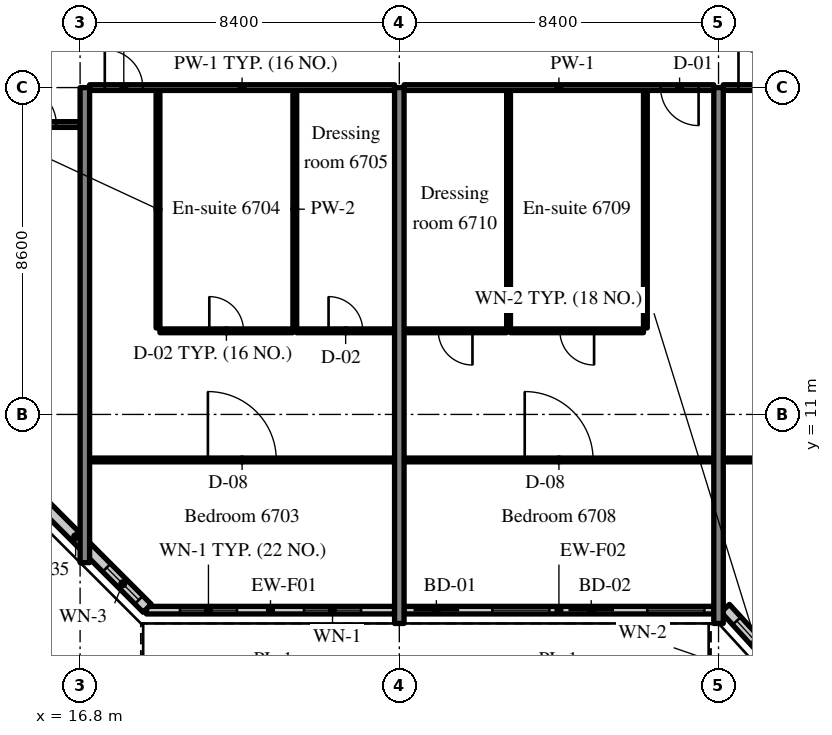
"""IFC4 building model, lengths in metres.
Left out: names, types, materials, properties, quantities, classifications, styles, units other than length and angle.
Written with IfcOpenShell. Run it as: python <this file> out.ifc"""

import sys

from ifc_helpers import new_model, si_unit, direction, frame, frame_2d, origin, place, context, subcontext, project, spatial, rectangle, extrude, source, transform, mapped, element, fill, save


model = new_model("IFC4")
c1 = context("Model", 3, precision=1e-05, world=origin(), true_north=direction((0.0, 1.0)))
c2 = subcontext(c1, "Body", "Model", "MODEL_VIEW")
j1 = project(units=[si_unit("LENGTHUNIT", "METRE"), si_unit("PLANEANGLEUNIT", "RADIAN")], contexts=[c1])
p1 = place(None, origin())
s1 = spatial("IfcSite", under=j1, at=p1, CompositionType="ELEMENT")
p2 = place(p1, origin())
s2 = spatial("IfcBuilding", under=s1, at=p2, CompositionType="ELEMENT")
p3 = place(p2, frame((0.0, 0.0, 281.7)))
s3 = spatial("IfcBuildingStorey", under=s2, at=p3, CompositionType="ELEMENT", Elevation=281.7)
m1 = source(origin(), c2, "Body", "SweptSolid", [
    extrude(rectangle(XDim=12.5, YDim=0.25, at=frame_2d((6.25, 0.0))), origin(), (0.0, 0.0, 1.0), 3.72),
])
p4 = place(p3, frame((16.925, 7.1, 0.0), z_axis=(0.0, 0.0, 1.0), x_axis=(0.0, 1.0, 0.0)))
e1 = element("IfcWall", 1, at=p4, inside=s3, PredefinedType="SHEAR", context=c2, shape_type="MappedRepresentation", body=[
    mapped(m1, transform((0.0, 0.0, 0.0), scale=1.0)),
])
m2 = source(origin(), c2, "Body", "SweptSolid", [
    extrude(rectangle(XDim=14.1, YDim=0.25, at=frame_2d((7.05, 0.0))), origin(), (0.0, 0.0, 1.0), 3.72),
])
for number, where, z_axis, x_axis in (
    (2, (25.2, 5.5, 0.0), (0.0, 0.0, 1.0), (0.0, 1.0, 0.0)),
    (3, (33.6, 5.5, 0.0), (0.0, 0.0, 1.0), (0.0, 1.0, 0.0)),
):
    element("IfcWall", number, at=place(p3, frame(where, z_axis=z_axis, x_axis=x_axis)), inside=s3, PredefinedType="SHEAR", context=c2, shape_type="MappedRepresentation", body=[
        mapped(m2, transform((0.0, 0.0, 0.0), scale=1.0)),
    ])
m3 = source(origin(), c2, "Body", "SweptSolid", [
    extrude(rectangle(XDim=6.53, YDim=0.2, at=frame_2d((3.265, 0.0))), origin(), (0.0, 0.0, 1.0), 3.17),
])
p5 = place(p3, frame((18.545, 5.85, 0.0), z_axis=(0.0, 0.0, 1.0), x_axis=(1.0, 0.0, 0.0)))
e4 = element("IfcWall", 4, at=p5, inside=s3, PredefinedType="SOLIDWALL", context=c2, shape_type="MappedRepresentation", body=[
    mapped(m3, transform((0.0, 0.0, 0.0), scale=1.0)),
])
m4 = source(origin(), c2, "Body", "SweptSolid", [
    extrude(rectangle(XDim=1.5, YDim=1.5, at=frame_2d((0.75, 0.75))), frame((0.0, 0.11, 0.0), z_axis=(0.0, -1.0, 0.0), x_axis=(1.0, 0.0, 0.0)), (0.0, 0.0, 1.0), 0.22),
])
p6 = place(p5, frame((0.883, 0.0, 0.9)))
e5 = element("IfcOpeningElement", 5, at=p6, cuts=e4, PredefinedType="OPENING", context=c2, shape_type="MappedRepresentation", body=[
    mapped(m4, transform((0.0, 0.0, 0.0), scale=1.0)),
])
p7 = place(p5, frame((4.147, 0.0, 0.9)))
e6 = element("IfcOpeningElement", 6, at=p7, cuts=e4, PredefinedType="OPENING", context=c2, shape_type="MappedRepresentation", body=[
    mapped(m4, transform((0.0, 0.0, 0.0), scale=1.0)),
])
m5 = source(origin(), c2, "Body", "SweptSolid", [
    extrude(rectangle(XDim=8.15, YDim=0.2, at=frame_2d((4.075, 0.0))), origin(), (0.0, 0.0, 1.0), 3.17),
])
p8 = place(p3, frame((25.325, 5.85, 0.0), z_axis=(0.0, 0.0, 1.0), x_axis=(1.0, 0.0, 0.0)))
e7 = element("IfcWall", 7, at=p8, inside=s3, PredefinedType="SOLIDWALL", context=c2, shape_type="MappedRepresentation", body=[
    mapped(m5, transform((0.0, 0.0, 0.0), scale=1.0)),
])
m6 = source(origin(), c2, "Body", "SweptSolid", [
    extrude(rectangle(XDim=1.2, YDim=2.4, at=frame_2d((0.6, 1.2))), frame((0.0, 0.11, 0.0), z_axis=(0.0, -1.0, 0.0), x_axis=(1.0, 0.0, 0.0)), (0.0, 0.0, 1.0), 0.22),
])
p9 = place(p8, frame((0.25, 0.0, 0.0)))
e8 = element("IfcOpeningElement", 8, at=p9, cuts=e7, PredefinedType="OPENING", context=c2, shape_type="MappedRepresentation", body=[
    mapped(m6, transform((0.0, 0.0, 0.0), scale=1.0)),
])
p10 = place(p8, frame((2.325, 0.0, 0.9)))
e9 = element("IfcOpeningElement", 9, at=p10, cuts=e7, PredefinedType="OPENING", context=c2, shape_type="MappedRepresentation", body=[
    mapped(m4, transform((0.0, 0.0, 0.0), scale=1.0)),
])
p11 = place(p8, frame((4.325, 0.0, 0.0)))
e10 = element("IfcOpeningElement", 10, at=p11, cuts=e7, PredefinedType="OPENING", context=c2, shape_type="MappedRepresentation", body=[
    mapped(m6, transform((0.0, 0.0, 0.0), scale=1.0)),
])
p12 = place(p8, frame((6.4, 0.0, 0.9)))
e11 = element("IfcOpeningElement", 11, at=p12, cuts=e7, PredefinedType="OPENING", context=c2, shape_type="MappedRepresentation", body=[
    mapped(m4, transform((0.0, 0.0, 0.0), scale=1.0)),
])
m7 = source(origin(), c2, "Body", "SweptSolid", [
    extrude(rectangle(XDim=2.398, YDim=0.3, at=frame_2d((1.199, 0.0))), origin(), (0.0, 0.0, 1.0), 3.72),
])
p13 = place(p3, frame((33.776, 5.9, 0.0), z_axis=(0.0, 0.0, 1.0), x_axis=(0.675374189419, -0.737475222815, 0.0)))
e12 = element("IfcWall", 12, at=p13, inside=s3, PredefinedType="SOLIDWALL", context=c2, shape_type="MappedRepresentation", body=[
    mapped(m7, transform((0.0, 0.0, 0.0), scale=1.0)),
])
m8 = source(origin(), c2, "Body", "SweptSolid", [
    extrude(rectangle(XDim=1.5, YDim=2.0, at=frame_2d((0.75, 1.0))), frame((0.0, 0.16, 0.0), z_axis=(0.0, -1.0, 0.0), x_axis=(1.0, 0.0, 0.0)), (0.0, 0.0, 1.0), 0.32),
])
p14 = place(p13, frame((0.449, 0.0, 0.9)))
e13 = element("IfcOpeningElement", 13, at=p14, cuts=e12, PredefinedType="OPENING", context=c2, shape_type="MappedRepresentation", body=[
    mapped(m8, transform((0.0, 0.0, 0.0), scale=1.0)),
])
m9 = source(origin(), c2, "Body", "SweptSolid", [
    extrude(rectangle(XDim=5.326, YDim=0.3, at=frame_2d((2.663, 0.0))), origin(), (0.0, 0.0, 1.0), 3.72),
])
p15 = place(p3, frame((14.8, 9.666, 0.0), z_axis=(0.0, 0.0, 1.0), x_axis=(0.707083859269, -0.707129702361, 0.0)))
e14 = element("IfcWall", 14, at=p15, inside=s3, PredefinedType="SOLIDWALL", context=c2, shape_type="MappedRepresentation", body=[
    mapped(m9, transform((0.0, 0.0, 0.0), scale=1.0)),
])
m10 = source(origin(), c2, "Body", "SweptSolid", [
    extrude(rectangle(XDim=1.2, YDim=1.5, at=frame_2d((0.6, 0.75))), frame((0.0, 0.16, 0.0), z_axis=(0.0, -1.0, 0.0), x_axis=(1.0, 0.0, 0.0)), (0.0, 0.0, 1.0), 0.32),
])
p16 = place(p15, frame((3.815, 0.0, 0.9)))
e15 = element("IfcOpeningElement", 15, at=p16, cuts=e14, PredefinedType="OPENING", context=c2, shape_type="MappedRepresentation", body=[
    mapped(m10, transform((0.0, 0.0, 0.0), scale=1.0)),
])
m11 = source(origin(), c2, "Body", "SweptSolid", [
    extrude(rectangle(XDim=6.25, YDim=0.1, at=frame_2d((3.125, 0.0))), origin(), (0.0, 0.0, 1.0), 3.72),
])
for number, where, z_axis, x_axis in (
    (16, (18.85, 13.275, 0.0), (0.0, 0.0, 1.0), (0.0, 1.0, 0.0)),
    (17, (22.45, 13.275, 0.0), (0.0, 0.0, 1.0), (0.0, 1.0, 0.0)),
):
    element("IfcWall", number, at=place(p3, frame(where, z_axis=z_axis, x_axis=x_axis)), inside=s3, PredefinedType="PARTITIONING", context=c2, shape_type="MappedRepresentation", body=[
        mapped(m11, transform((0.0, 0.0, 0.0), scale=1.0)),
    ])
m12 = source(origin(), c2, "Body", "SweptSolid", [
    extrude(rectangle(XDim=3.5, YDim=0.1, at=frame_2d((1.75, 0.0))), origin(), (0.0, 0.0, 1.0), 3.72),
])
p17 = place(p3, frame((18.9, 13.2, 0.0), z_axis=(0.0, 0.0, 1.0), x_axis=(1.0, 0.0, 0.0)))
e18 = element("IfcWall", 18, at=p17, inside=s3, PredefinedType="PARTITIONING", context=c2, shape_type="MappedRepresentation", body=[
    mapped(m12, transform((0.0, 0.0, 0.0), scale=1.0)),
])
m13 = source(origin(), c2, "Body", "SweptSolid", [
    extrude(rectangle(XDim=0.9, YDim=2.1, at=frame_2d((0.45, 1.05))), frame((0.0, 0.06, 0.0), z_axis=(0.0, -1.0, 0.0), x_axis=(1.0, 0.0, 0.0)), (0.0, 0.0, 1.0), 0.12),
])
p18 = place(p17, frame((1.3, 0.0, 0.0)))
e19 = element("IfcOpeningElement", 19, at=p18, cuts=e18, PredefinedType="OPENING", context=c2, shape_type="MappedRepresentation", body=[
    mapped(m13, transform((0.0, 0.0, 0.0), scale=1.0)),
])
m14 = source(origin(), c2, "Body", "SweptSolid", [
    extrude(rectangle(XDim=2.575, YDim=0.1, at=frame_2d((1.288, 0.0))), origin(), (0.0, 0.0, 1.0), 3.72),
])
p19 = place(p3, frame((22.5, 13.2, 0.0), z_axis=(0.0, 0.0, 1.0), x_axis=(1.0, 0.0, 0.0)))
e20 = element("IfcWall", 20, at=p19, inside=s3, PredefinedType="PARTITIONING", context=c2, shape_type="MappedRepresentation", body=[
    mapped(m14, transform((0.0, 0.0, 0.0), scale=1.0)),
])
p20 = place(p19, frame((0.838, 0.0, 0.0)))
e21 = element("IfcOpeningElement", 21, at=p20, cuts=e20, PredefinedType="OPENING", context=c2, shape_type="MappedRepresentation", body=[
    mapped(m13, transform((0.0, 0.0, 0.0), scale=1.0)),
])
m15 = source(origin(), c2, "Body", "SweptSolid", [
    extrude(rectangle(XDim=8.025, YDim=0.1, at=frame_2d((4.012, 0.0))), origin(), (0.0, 0.0, 1.0), 3.72),
])
p21 = place(p3, frame((17.05, 9.802, 0.0), z_axis=(0.0, 0.0, 1.0), x_axis=(1.0, 0.0, 0.0)))
e22 = element("IfcWall", 22, at=p21, inside=s3, PredefinedType="PARTITIONING", context=c2, shape_type="MappedRepresentation", body=[
    mapped(m15, transform((0.0, 0.0, 0.0), scale=1.0)),
])
m16 = source(origin(), c2, "Body", "SweptSolid", [
    extrude(rectangle(XDim=1.8, YDim=2.1, at=frame_2d((0.9, 1.05))), frame((0.0, 0.06, 0.0), z_axis=(0.0, -1.0, 0.0), x_axis=(1.0, 0.0, 0.0)), (0.0, 0.0, 1.0), 0.12),
])
p22 = place(p21, frame((3.113, 0.0, 0.0)))
e23 = element("IfcOpeningElement", 23, at=p22, cuts=e22, PredefinedType="OPENING", context=c2, shape_type="MappedRepresentation", body=[
    mapped(m16, transform((0.0, 0.0, 0.0), scale=1.0)),
])
m17 = source(origin(), c2, "Body", "SweptSolid", [
    extrude(rectangle(XDim=8.025, YDim=0.15, at=frame_2d((4.012, 0.0))), origin(), (0.0, 0.0, 1.0), 3.02),
])
p23 = place(p3, frame((17.05, 19.6, 0.0), z_axis=(0.0, 0.0, 1.0), x_axis=(1.0, 0.0, 0.0)))
e24 = element("IfcWall", 24, at=p23, inside=s3, PredefinedType="PARTITIONING", context=c2, shape_type="MappedRepresentation", body=[
    mapped(m17, transform((0.0, 0.0, 0.0), scale=1.0)),
])
m18 = source(origin(), c2, "Body", "SweptSolid", [
    extrude(rectangle(XDim=1.0, YDim=2.1, at=frame_2d((0.5, 1.05))), frame((0.0, 0.085, 0.0), z_axis=(0.0, -1.0, 0.0), x_axis=(1.0, 0.0, 0.0)), (0.0, 0.0, 1.0), 0.17),
])
p24 = place(p23, frame((0.4, 0.0, 0.0)))
e25 = element("IfcOpeningElement", 25, at=p24, cuts=e24, PredefinedType="OPENING", context=c2, shape_type="MappedRepresentation", body=[
    mapped(m18, transform((0.0, 0.0, 0.0), scale=1.0)),
])
for number, where, z_axis, x_axis in (
    (26, (31.675, 13.275, 0.0), (0.0, 0.0, 1.0), (0.0, 1.0, 0.0)),
    (27, (28.075, 13.275, 0.0), (0.0, 0.0, 1.0), (0.0, 1.0, 0.0)),
):
    element("IfcWall", number, at=place(p3, frame(where, z_axis=z_axis, x_axis=x_axis)), inside=s3, PredefinedType="PARTITIONING", context=c2, shape_type="MappedRepresentation", body=[
        mapped(m11, transform((0.0, 0.0, 0.0), scale=1.0)),
    ])
p25 = place(p3, frame((28.125, 13.2, 0.0), z_axis=(0.0, 0.0, 1.0), x_axis=(1.0, 0.0, 0.0)))
e28 = element("IfcWall", 28, at=p25, inside=s3, PredefinedType="PARTITIONING", context=c2, shape_type="MappedRepresentation", body=[
    mapped(m12, transform((0.0, 0.0, 0.0), scale=1.0)),
])
p26 = place(p25, frame((1.3, 0.0, 0.0)))
e29 = element("IfcOpeningElement", 29, at=p26, cuts=e28, PredefinedType="OPENING", context=c2, shape_type="MappedRepresentation", body=[
    mapped(m13, transform((0.0, 0.0, 0.0), scale=1.0)),
])
m19 = source(origin(), c2, "Body", "SweptSolid", [
    extrude(rectangle(XDim=2.7, YDim=0.1, at=frame_2d((1.35, 0.0))), origin(), (0.0, 0.0, 1.0), 3.72),
])
p27 = place(p3, frame((25.325, 13.2, 0.0), z_axis=(0.0, 0.0, 1.0), x_axis=(1.0, 0.0, 0.0)))
e30 = element("IfcWall", 30, at=p27, inside=s3, PredefinedType="PARTITIONING", context=c2, shape_type="MappedRepresentation", body=[
    mapped(m19, transform((0.0, 0.0, 0.0), scale=1.0)),
])
p28 = place(p27, frame((0.9, 0.0, 0.0)))
e31 = element("IfcOpeningElement", 31, at=p28, cuts=e30, PredefinedType="OPENING", context=c2, shape_type="MappedRepresentation", body=[
    mapped(m13, transform((0.0, 0.0, 0.0), scale=1.0)),
])
m20 = source(origin(), c2, "Body", "SweptSolid", [
    extrude(rectangle(XDim=8.15, YDim=0.1, at=frame_2d((4.075, 0.0))), origin(), (0.0, 0.0, 1.0), 3.72),
])
p29 = place(p3, frame((25.325, 9.802, 0.0), z_axis=(0.0, 0.0, 1.0), x_axis=(1.0, 0.0, 0.0)))
e32 = element("IfcWall", 32, at=p29, inside=s3, PredefinedType="PARTITIONING", context=c2, shape_type="MappedRepresentation", body=[
    mapped(m20, transform((0.0, 0.0, 0.0), scale=1.0)),
])
p30 = place(p29, frame((3.175, 0.0, 0.0)))
e33 = element("IfcOpeningElement", 33, at=p30, cuts=e32, PredefinedType="OPENING", context=c2, shape_type="MappedRepresentation", body=[
    mapped(m16, transform((0.0, 0.0, 0.0), scale=1.0)),
])
m21 = source(origin(), c2, "Body", "SweptSolid", [
    extrude(rectangle(XDim=8.15, YDim=0.15, at=frame_2d((4.075, 0.0))), origin(), (0.0, 0.0, 1.0), 3.02),
])
p31 = place(p3, frame((25.325, 19.6, 0.0), z_axis=(0.0, 0.0, 1.0), x_axis=(1.0, 0.0, 0.0)))
e34 = element("IfcWall", 34, at=p31, inside=s3, PredefinedType="PARTITIONING", context=c2, shape_type="MappedRepresentation", body=[
    mapped(m21, transform((0.0, 0.0, 0.0), scale=1.0)),
])
p32 = place(p31, frame((6.75, 0.0, 0.0)))
e35 = element("IfcOpeningElement", 35, at=p32, cuts=e34, PredefinedType="OPENING", context=c2, shape_type="MappedRepresentation", body=[
    mapped(m18, transform((0.0, 0.0, 0.0), scale=1.0)),
])
m22 = source(origin(), c2, "Body", "SweptSolid", [
    extrude(rectangle(XDim=8.15, YDim=0.1, at=frame_2d((4.075, 0.0))), origin(), (0.0, 0.0, 1.0), 3.72),
])
p33 = place(p3, frame((33.725, 9.802, 0.0), z_axis=(0.0, 0.0, 1.0), x_axis=(1.0, 0.0, 0.0)))
e36 = element("IfcWall", 36, at=p33, inside=s3, PredefinedType="PARTITIONING", context=c2, shape_type="MappedRepresentation", body=[
    mapped(m22, transform((0.0, 0.0, 0.0), scale=1.0)),
])
p34 = place(p33, frame((3.175, 0.0, 0.0)))
e37 = element("IfcOpeningElement", 37, at=p34, cuts=e36, PredefinedType="OPENING", context=c2, shape_type="MappedRepresentation", body=[
    mapped(m16, transform((0.0, 0.0, 0.0), scale=1.0)),
])
m23 = source(origin(), c2, "Body", "SweptSolid", [
    extrude(rectangle(XDim=8.15, YDim=0.15, at=frame_2d((4.075, 0.0))), origin(), (0.0, 0.0, 1.0), 3.02),
])
p35 = place(p3, frame((33.725, 19.6, 0.0), z_axis=(0.0, 0.0, 1.0), x_axis=(1.0, 0.0, 0.0)))
e38 = element("IfcWall", 38, at=p35, inside=s3, PredefinedType="PARTITIONING", context=c2, shape_type="MappedRepresentation", body=[
    mapped(m23, transform((0.0, 0.0, 0.0), scale=1.0)),
])
p36 = place(p35, frame((0.4, 0.0, 0.0)))
e39 = element("IfcOpeningElement", 39, at=p36, cuts=e38, PredefinedType="OPENING", context=c2, shape_type="MappedRepresentation", body=[
    mapped(m18, transform((0.0, 0.0, 0.0), scale=1.0)),
])
m24 = source(origin(), c2, "Body", "SweptSolid", [
    extrude(rectangle(XDim=1.9, YDim=0.15, at=frame_2d((0.95, 0.0))), origin(), (0.0, 0.0, 1.0), 3.02),
])
p37 = place(p3, frame((14.9, 18.628, 0.0), z_axis=(0.0, 0.0, 1.0), x_axis=(1.0, 0.0, 0.0)))
e40 = element("IfcWall", 40, at=p37, inside=s3, PredefinedType="PARTITIONING", context=c2, shape_type="MappedRepresentation", body=[
    mapped(m24, transform((0.0, 0.0, 0.0), scale=1.0)),
])
p38 = place(p37, frame((0.275, 0.0, 0.0)))
e41 = element("IfcOpeningElement", 41, at=p38, cuts=e40, PredefinedType="OPENING", context=c2, shape_type="MappedRepresentation", body=[
    mapped(m18, transform((0.0, 0.0, 0.0), scale=1.0)),
])
m25 = source(origin(), c2, "Body", "SweptSolid", [
    extrude(rectangle(XDim=1.5, YDim=1.5, at=frame_2d((0.75, 0.75))), frame((0.0, 0.03, 0.0), z_axis=(0.0, -1.0, 0.0), x_axis=(1.0, 0.0, 0.0)), (0.0, 0.0, 1.0), 0.06),
])
p39 = place(p6, origin())
e42 = element("IfcWindow", 42, at=p39, inside=s3, PartitioningType="SINGLE_PANEL", PredefinedType="WINDOW", context=c2, shape_type="MappedRepresentation", body=[
    mapped(m25, transform((0.0, 0.0, 0.0), scale=1.0)),
])
fill(e5, e42)
p40 = place(p7, origin())
e43 = element("IfcWindow", 43, at=p40, inside=s3, PartitioningType="SINGLE_PANEL", PredefinedType="WINDOW", context=c2, shape_type="MappedRepresentation", body=[
    mapped(m25, transform((0.0, 0.0, 0.0), scale=1.0)),
])
fill(e6, e43)
m26 = source(origin(), c2, "Body", "SweptSolid", [
    extrude(rectangle(XDim=1.2, YDim=2.4, at=frame_2d((0.6, 1.2))), frame((0.0, 0.025, 0.0), z_axis=(0.0, -1.0, 0.0), x_axis=(1.0, 0.0, 0.0)), (0.0, 0.0, 1.0), 0.05),
])
p41 = place(p9, origin())
e44 = element("IfcDoor", 44, at=p41, inside=s3, OperationType="SLIDING_TO_LEFT", PredefinedType="DOOR", context=c2, shape_type="MappedRepresentation", body=[
    mapped(m26, transform((0.0, 0.0, 0.0), scale=1.0)),
])
fill(e8, e44)
p42 = place(p10, origin())
e45 = element("IfcWindow", 45, at=p42, inside=s3, PartitioningType="SINGLE_PANEL", PredefinedType="WINDOW", context=c2, shape_type="MappedRepresentation", body=[
    mapped(m25, transform((0.0, 0.0, 0.0), scale=1.0)),
])
fill(e9, e45)
p43 = place(p11, origin())
e46 = element("IfcDoor", 46, at=p43, inside=s3, OperationType="SLIDING_TO_RIGHT", PredefinedType="DOOR", context=c2, shape_type="MappedRepresentation", body=[
    mapped(m26, transform((0.0, 0.0, 0.0), scale=1.0)),
])
fill(e10, e46)
p44 = place(p12, origin())
e47 = element("IfcWindow", 47, at=p44, inside=s3, PartitioningType="SINGLE_PANEL", PredefinedType="WINDOW", context=c2, shape_type="MappedRepresentation", body=[
    mapped(m25, transform((0.0, 0.0, 0.0), scale=1.0)),
])
fill(e11, e47)
m27 = source(origin(), c2, "Body", "SweptSolid", [
    extrude(rectangle(XDim=1.5, YDim=2.0, at=frame_2d((0.75, 1.0))), frame((0.0, 0.03, 0.0), z_axis=(0.0, -1.0, 0.0), x_axis=(1.0, 0.0, 0.0)), (0.0, 0.0, 1.0), 0.06),
])
p45 = place(p14, origin())
e48 = element("IfcWindow", 48, at=p45, inside=s3, PartitioningType="SINGLE_PANEL", PredefinedType="WINDOW", context=c2, shape_type="MappedRepresentation", body=[
    mapped(m27, transform((0.0, 0.0, 0.0), scale=1.0)),
])
fill(e13, e48)
m28 = source(origin(), c2, "Body", "SweptSolid", [
    extrude(rectangle(XDim=1.2, YDim=1.5, at=frame_2d((0.6, 0.75))), frame((0.0, 0.03, 0.0), z_axis=(0.0, -1.0, 0.0), x_axis=(1.0, 0.0, 0.0)), (0.0, 0.0, 1.0), 0.06),
])
p46 = place(p16, origin())
e49 = element("IfcWindow", 49, at=p46, inside=s3, PartitioningType="SINGLE_PANEL", PredefinedType="WINDOW", context=c2, shape_type="MappedRepresentation", body=[
    mapped(m28, transform((0.0, 0.0, 0.0), scale=1.0)),
])
fill(e15, e49)
m29 = source(origin(), c2, "Body", "SweptSolid", [
    extrude(rectangle(XDim=0.9, YDim=2.1, at=frame_2d((0.45, 1.05))), frame((0.0, 0.025, 0.0), z_axis=(0.0, -1.0, 0.0), x_axis=(1.0, 0.0, 0.0)), (0.0, 0.0, 1.0), 0.05),
])
p47 = place(p18, origin())
e50 = element("IfcDoor", 50, at=p47, inside=s3, OperationType="SINGLE_SWING_LEFT", PredefinedType="DOOR", context=c2, shape_type="MappedRepresentation", body=[
    mapped(m29, transform((0.0, 0.0, 0.0), scale=1.0)),
])
fill(e19, e50)
p48 = place(p20, origin())
e51 = element("IfcDoor", 51, at=p48, inside=s3, OperationType="SINGLE_SWING_LEFT", PredefinedType="DOOR", context=c2, shape_type="MappedRepresentation", body=[
    mapped(m29, transform((0.0, 0.0, 0.0), scale=1.0)),
])
fill(e21, e51)
m30 = source(origin(), c2, "Body", "SweptSolid", [
    extrude(rectangle(XDim=1.8, YDim=2.1, at=frame_2d((0.9, 1.05))), frame((0.0, 0.025, 0.0), z_axis=(0.0, -1.0, 0.0), x_axis=(1.0, 0.0, 0.0)), (0.0, 0.0, 1.0), 0.05),
])
p49 = place(p22, origin())
e52 = element("IfcDoor", 52, at=p49, inside=s3, OperationType="DOUBLE_DOOR_SINGLE_SWING", PredefinedType="DOOR", context=c2, shape_type="MappedRepresentation", body=[
    mapped(m30, transform((0.0, 0.0, 0.0), scale=1.0)),
])
fill(e23, e52)
m31 = source(origin(), c2, "Body", "SweptSolid", [
    extrude(rectangle(XDim=1.0, YDim=2.1, at=frame_2d((0.5, 1.05))), frame((0.0, 0.025, 0.0), z_axis=(0.0, -1.0, 0.0), x_axis=(1.0, 0.0, 0.0)), (0.0, 0.0, 1.0), 0.05),
])
p50 = place(p24, origin())
e53 = element("IfcDoor", 53, at=p50, inside=s3, OperationType="SINGLE_SWING_LEFT", PredefinedType="DOOR", context=c2, shape_type="MappedRepresentation", body=[
    mapped(m31, transform((0.0, 0.0, 0.0), scale=1.0)),
])
fill(e25, e53)
p51 = place(p26, origin())
e54 = element("IfcDoor", 54, at=p51, inside=s3, OperationType="SINGLE_SWING_RIGHT", PredefinedType="DOOR", context=c2, shape_type="MappedRepresentation", body=[
    mapped(m29, transform((0.0, 0.0, 0.0), scale=1.0)),
])
fill(e29, e54)
p52 = place(p28, origin())
e55 = element("IfcDoor", 55, at=p52, inside=s3, OperationType="SINGLE_SWING_RIGHT", PredefinedType="DOOR", context=c2, shape_type="MappedRepresentation", body=[
    mapped(m29, transform((0.0, 0.0, 0.0), scale=1.0)),
])
fill(e31, e55)
p53 = place(p30, origin())
e56 = element("IfcDoor", 56, at=p53, inside=s3, OperationType="DOUBLE_DOOR_SINGLE_SWING", PredefinedType="DOOR", context=c2, shape_type="MappedRepresentation", body=[
    mapped(m30, transform((0.0, 0.0, 0.0), scale=1.0)),
])
fill(e33, e56)
p54 = place(p32, origin())
e57 = element("IfcDoor", 57, at=p54, inside=s3, OperationType="SINGLE_SWING_RIGHT", PredefinedType="DOOR", context=c2, shape_type="MappedRepresentation", body=[
    mapped(m31, transform((0.0, 0.0, 0.0), scale=1.0)),
])
fill(e35, e57)
p55 = place(p36, origin())
e58 = element("IfcDoor", 58, at=p55, inside=s3, OperationType="SINGLE_SWING_LEFT", PredefinedType="DOOR", context=c2, shape_type="MappedRepresentation", body=[
    mapped(m31, transform((0.0, 0.0, 0.0), scale=1.0)),
])
fill(e39, e58)
p56 = place(p38, origin())
e59 = element("IfcDoor", 59, at=p56, inside=s3, OperationType="SINGLE_SWING_LEFT", PredefinedType="DOOR", context=c2, shape_type="MappedRepresentation", body=[
    mapped(m31, transform((0.0, 0.0, 0.0), scale=1.0)),
])
fill(e41, e59)
save(model, sys.argv[1])
